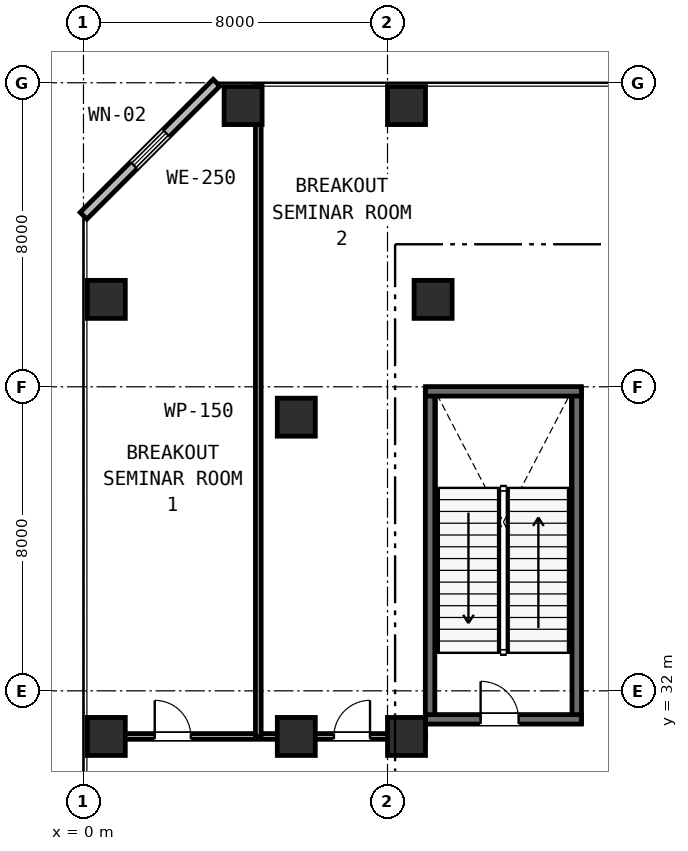
"""IFC4 building model, lengths in metres.
Left out: names, types, materials, properties, quantities, classifications, styles, units other than length and angle.
Written with IfcOpenShell. Run it as: python <this file> out.ifc"""

import sys

from ifc_helpers import new_model, si_unit, direction, frame, frame_2d, origin, origin_2d, place, context, subcontext, project, spatial, rectangle, extrude, element, fill, save


model = new_model("IFC4")
c1 = context("Model", 3, precision=1e-05, world=origin(), true_north=direction((0.0, 1.0)))
c2 = subcontext(c1, "Body", "Model", "MODEL_VIEW")
j1 = project(units=[si_unit("LENGTHUNIT", "METRE"), si_unit("PLANEANGLEUNIT", "RADIAN")], contexts=[c1])
p1 = place(None, origin())
s1 = spatial("IfcSite", under=j1, at=p1, CompositionType="ELEMENT")
p2 = place(p1, origin())
s2 = spatial("IfcBuilding", under=s1, at=p2, CompositionType="ELEMENT")
p3 = place(p2, frame((0.0, 0.0, 11.1)))
s3 = spatial("IfcBuildingStorey", under=s2, at=p3, CompositionType="ELEMENT", Elevation=11.1)
for number, where, z_axis, x_axis in (
    (1, (9.12, 31.15, 0.0), (0.0, 0.0, 1.0), (0.0, 1.0, 0.0)),
    (2, (12.98, 31.15, 0.0), (0.0, 0.0, 1.0), (0.0, 1.0, 0.0)),
):
    element("IfcWall", number, at=place(p3, frame(where, z_axis=z_axis, x_axis=x_axis)), inside=s3, PredefinedType="SHEAR", context=c2, shape_type="SweptSolid", body=[
        extrude(rectangle(XDim=8.8, YDim=0.25, at=frame_2d((4.4, 0.0))), origin(), (0.0, 0.0, 1.0), 4.8),
    ])
p4 = place(p3, frame((9.0, 39.88, 0.0), z_axis=(0.0, 0.0, 1.0), x_axis=(1.0, 0.0, 0.0)))
e3 = element("IfcWall", 3, at=p4, inside=s3, PredefinedType="SHEAR", context=c2, shape_type="SweptSolid", body=[
    extrude(rectangle(XDim=4.1, YDim=0.25, at=frame_2d((2.05, 0.0))), origin(), (0.0, 0.0, 1.0), 4.8),
])
p5 = place(p3, frame((9.0, 31.25, 0.0), z_axis=(0.0, 0.0, 1.0), x_axis=(1.0, 0.0, 0.0)))
e4 = element("IfcWall", 4, at=p5, inside=s3, PredefinedType="SHEAR", context=c2, shape_type="SweptSolid", body=[
    extrude(rectangle(XDim=4.1, YDim=0.25, at=frame_2d((2.05, 0.0))), origin(), (0.0, 0.0, 1.0), 4.8),
])
p6 = place(p5, frame((1.45, 0.0, 0.0)))
e5 = element("IfcOpeningElement", 5, at=p6, cuts=e4, PredefinedType="OPENING", context=c2, shape_type="SweptSolid", body=[
    extrude(rectangle(XDim=1.0, YDim=2.15, at=frame_2d((0.5, 1.075))), frame((0.0, 0.135, 0.0), z_axis=(0.0, -1.0, 0.0), x_axis=(1.0, 0.0, 0.0)), (0.0, 0.0, 1.0), 0.27),
])
for number, where, z_axis, x_axis in (
    (6, (5.6, 30.8, 0.0), (0.0, 0.0, 1.0), (1.0, 0.0, 0.0)),
    (7, (5.6, 39.2, 0.0), (0.0, 0.0, 1.0), (1.0, 0.0, 0.0)),
    (8, (8.5, 30.8, 0.0), (0.0, 0.0, 1.0), (1.0, 0.0, 0.0)),
    (9, (9.2, 42.3, 0.0), (0.0, 0.0, 1.0), (1.0, 0.0, 0.0)),
    (10, (0.6, 30.8, 0.0), (0.0, 0.0, 1.0), (1.0, 0.0, 0.0)),
    (11, (0.6, 42.3, 0.0), (0.0, 0.0, 1.0), (1.0, 0.0, 0.0)),
    (12, (4.2, 47.4, 0.0), (0.0, 0.0, 1.0), (1.0, 0.0, 0.0)),
    (13, (8.5, 47.4, 0.0), (0.0, 0.0, 1.0), (1.0, 0.0, 0.0)),
):
    element("IfcColumn", number, at=place(p3, frame(where, z_axis=z_axis, x_axis=x_axis)), inside=s3, PredefinedType="COLUMN", context=c2, shape_type="SweptSolid", body=[
        extrude(rectangle(XDim=1.0, YDim=1.0, at=origin_2d()), origin(), (0.0, 0.0, 1.0), 4.8),
    ])
p7 = place(p3, frame((3.5, 48.0, 0.0), z_axis=(0.0, 0.0, 1.0), x_axis=(-0.707106781187, -0.707106781187, 0.0)))
e14 = element("IfcWall", 14, at=p7, inside=s3, PredefinedType="STANDARD", context=c2, shape_type="SweptSolid", body=[
    extrude(rectangle(XDim=4.95, YDim=0.25, at=frame_2d((2.475, 0.0))), origin(), (0.0, 0.0, 1.0), 4.47),
])
p8 = place(p7, frame((1.875, 0.0, 0.85)))
e15 = element("IfcOpeningElement", 15, at=p8, cuts=e14, PredefinedType="OPENING", context=c2, shape_type="SweptSolid", body=[
    extrude(rectangle(XDim=1.2, YDim=1.6, at=frame_2d((0.6, 0.8))), frame((0.0, 0.135, 0.0), z_axis=(0.0, -1.0, 0.0), x_axis=(1.0, 0.0, 0.0)), (0.0, 0.0, 1.0), 0.27),
])
p9 = place(p3, frame((0.1, 30.8, 0.0), z_axis=(0.0, 0.0, 1.0), x_axis=(1.0, 0.0, 0.0)))
e16 = element("IfcWall", 16, at=p9, inside=s3, PredefinedType="PARTITIONING", context=c2, shape_type="SweptSolid", body=[
    extrude(rectangle(XDim=8.9, YDim=0.15, at=frame_2d((4.45, 0.0))), origin(), (0.0, 0.0, 1.0), 3.82),
])
p10 = place(p9, frame((1.775, 0.0, 0.0)))
e17 = element("IfcOpeningElement", 17, at=p10, cuts=e16, PredefinedType="OPENING", context=c2, shape_type="SweptSolid", body=[
    extrude(rectangle(XDim=0.95, YDim=2.15, at=frame_2d((0.475, 1.075))), frame((0.0, 0.085, 0.0), z_axis=(0.0, -1.0, 0.0), x_axis=(1.0, 0.0, 0.0)), (0.0, 0.0, 1.0), 0.17),
])
p11 = place(p9, frame((6.49, 0.0, 0.0)))
e18 = element("IfcOpeningElement", 18, at=p11, cuts=e16, PredefinedType="OPENING", context=c2, shape_type="SweptSolid", body=[
    extrude(rectangle(XDim=0.95, YDim=2.15, at=frame_2d((0.475, 1.075))), frame((0.0, 0.085, 0.0), z_axis=(0.0, -1.0, 0.0), x_axis=(1.0, 0.0, 0.0)), (0.0, 0.0, 1.0), 0.17),
])
p12 = place(p3, frame((4.6, 30.8, 0.0), z_axis=(0.0, 0.0, 1.0), x_axis=(0.0, 1.0, 0.0)))
e19 = element("IfcWall", 19, at=p12, inside=s3, PredefinedType="PARTITIONING", context=c2, shape_type="SweptSolid", body=[
    extrude(rectangle(XDim=17.1, YDim=0.15, at=frame_2d((8.55, 0.0))), origin(), (0.0, 0.0, 1.0), 3.82),
])
p13 = place(p8, origin())
e20 = element("IfcWindow", 20, at=p13, inside=s3, PartitioningType="SINGLE_PANEL", PredefinedType="WINDOW", context=c2, shape_type="SweptSolid", body=[
    extrude(rectangle(XDim=1.2, YDim=1.6, at=frame_2d((0.6, 0.8))), frame((0.0, 0.03, 0.0), z_axis=(0.0, -1.0, 0.0), x_axis=(1.0, 0.0, 0.0)), (0.0, 0.0, 1.0), 0.06),
])
fill(e15, e20)
p14 = place(p6, origin())
e21 = element("IfcDoor", 21, at=p14, inside=s3, OperationType="SINGLE_SWING_LEFT", PredefinedType="DOOR", context=c2, shape_type="SweptSolid", body=[
    extrude(rectangle(XDim=1.0, YDim=2.15, at=frame_2d((0.5, 1.075))), frame((0.0, 0.025, 0.0), z_axis=(0.0, -1.0, 0.0), x_axis=(1.0, 0.0, 0.0)), (0.0, 0.0, 1.0), 0.05),
])
fill(e5, e21)
p15 = place(p10, origin())
e22 = element("IfcDoor", 22, at=p15, inside=s3, OperationType="SINGLE_SWING_LEFT", PredefinedType="DOOR", context=c2, shape_type="SweptSolid", body=[
    extrude(rectangle(XDim=0.95, YDim=2.15, at=frame_2d((0.475, 1.075))), frame((0.0, 0.025, 0.0), z_axis=(0.0, -1.0, 0.0), x_axis=(1.0, 0.0, 0.0)), (0.0, 0.0, 1.0), 0.05),
])
fill(e17, e22)
p16 = place(p11, origin())
e23 = element("IfcDoor", 23, at=p16, inside=s3, OperationType="SINGLE_SWING_RIGHT", PredefinedType="DOOR", context=c2, shape_type="SweptSolid", body=[
    extrude(rectangle(XDim=0.95, YDim=2.15, at=frame_2d((0.475, 1.075))), frame((0.0, 0.025, 0.0), z_axis=(0.0, -1.0, 0.0), x_axis=(1.0, 0.0, 0.0)), (0.0, 0.0, 1.0), 0.05),
])
fill(e18, e23)
save(model, sys.argv[1])
